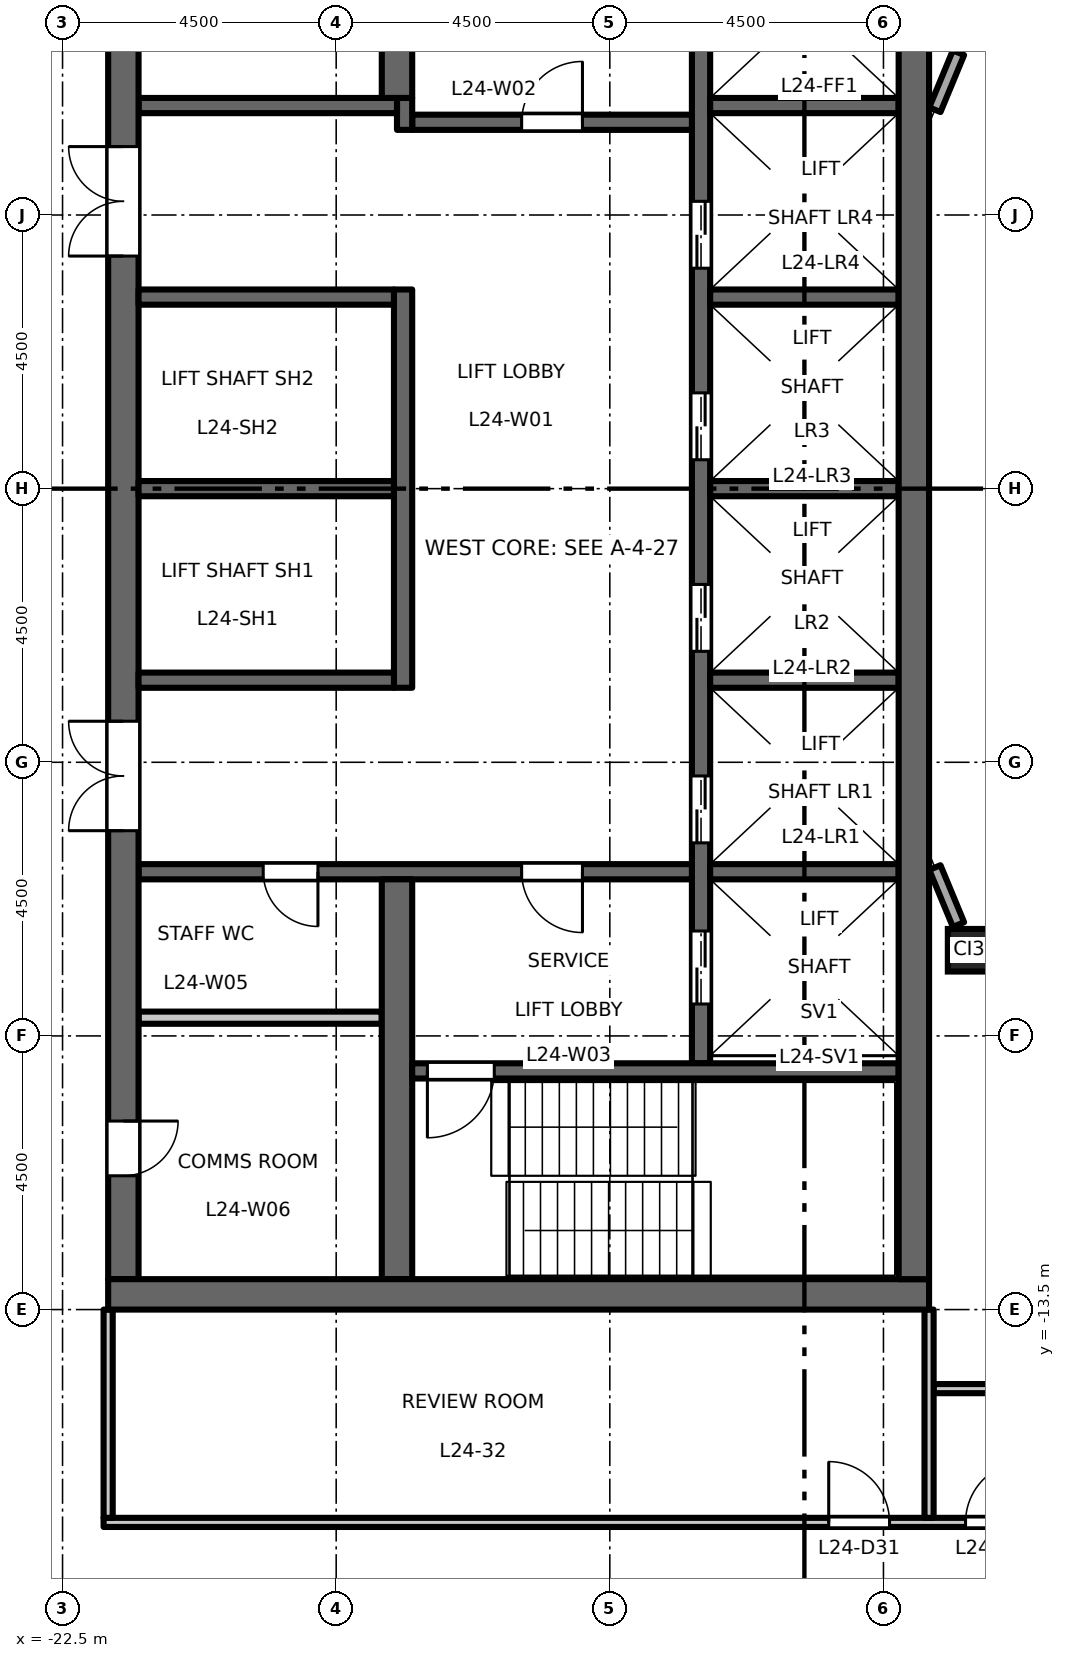
"""IFC4 building model, lengths in metres.
Left out: names, types, materials, properties, quantities, classifications, styles, units other than length and angle.
Written with IfcOpenShell. Run it as: python <this file> out.ifc"""

import sys

from ifc_helpers import new_model, si_unit, direction, frame, frame_2d, origin, origin_2d, place, context, subcontext, project, spatial, rectangle, hollow_rectangle, extrude, element, fill, save


model = new_model("IFC4")
c1 = context("Model", 3, precision=1e-05, world=origin(), true_north=direction((0.0, 1.0)))
c2 = subcontext(c1, "Body", "Model", "MODEL_VIEW")
j1 = project(units=[si_unit("LENGTHUNIT", "METRE"), si_unit("PLANEANGLEUNIT", "RADIAN")], contexts=[c1])
p1 = place(None, origin())
s1 = spatial("IfcSite", under=j1, at=p1, CompositionType="ELEMENT")
p2 = place(p1, origin())
s2 = spatial("IfcBuilding", under=s1, at=p2, CompositionType="ELEMENT")
p3 = place(p2, frame((0.0, 0.0, 113.7)))
s3 = spatial("IfcBuildingStorey", under=s2, at=p3, CompositionType="ELEMENT", Elevation=113.7)
p4 = place(p3, frame((-7.591, -7.591, 0.0), z_axis=(0.0, 0.0, 1.0), x_axis=(1.0, 0.0, 0.0)))
e1 = element("IfcColumn", 1, at=p4, inside=s3, PredefinedType="COLUMN", context=c2, shape_type="SweptSolid", body=[
    extrude(hollow_rectangle(XDim=0.7, YDim=0.7, WallThickness=0.04, at=origin_2d()), origin(), (0.0, 0.0, 1.0), 4.5),
])
p5 = place(p3, frame((-12.0, -9.45, 0.0), z_axis=(0.0, 0.0, 1.0), x_axis=(0.0, 1.0, 0.0)))
e2 = element("IfcWall", 2, at=p5, inside=s3, PredefinedType="SHEAR", context=c2, shape_type="SweptSolid", body=[
    extrude(rectangle(XDim=18.9, YDim=0.3, at=frame_2d((9.45, 0.0))), origin(), (0.0, 0.0, 1.0), 4.35),
])
p6 = place(p5, frame((3.625, 0.0, 0.0)))
e3 = element("IfcOpeningElement", 3, at=p6, cuts=e2, PredefinedType="OPENING", context=c2, shape_type="SweptSolid", body=[
    extrude(rectangle(XDim=1.1, YDim=2.1, at=frame_2d((0.55, 1.05))), frame((0.0, 0.16, 0.0), z_axis=(0.0, -1.0, 0.0), x_axis=(1.0, 0.0, 0.0)), (0.0, 0.0, 1.0), 0.32),
])
p7 = place(p5, frame((6.775, 0.0, 0.0)))
e4 = element("IfcOpeningElement", 4, at=p7, cuts=e2, PredefinedType="OPENING", context=c2, shape_type="SweptSolid", body=[
    extrude(rectangle(XDim=1.1, YDim=2.1, at=frame_2d((0.55, 1.05))), frame((0.0, 0.16, 0.0), z_axis=(0.0, -1.0, 0.0), x_axis=(1.0, 0.0, 0.0)), (0.0, 0.0, 1.0), 0.32),
])
p8 = place(p5, frame((9.925, 0.0, 0.0)))
e5 = element("IfcOpeningElement", 5, at=p8, cuts=e2, PredefinedType="OPENING", context=c2, shape_type="SweptSolid", body=[
    extrude(rectangle(XDim=1.1, YDim=2.1, at=frame_2d((0.55, 1.05))), frame((0.0, 0.16, 0.0), z_axis=(0.0, -1.0, 0.0), x_axis=(1.0, 0.0, 0.0)), (0.0, 0.0, 1.0), 0.32),
])
p9 = place(p5, frame((13.075, 0.0, 0.0)))
e6 = element("IfcOpeningElement", 6, at=p9, cuts=e2, PredefinedType="OPENING", context=c2, shape_type="SweptSolid", body=[
    extrude(rectangle(XDim=1.1, YDim=2.1, at=frame_2d((0.55, 1.05))), frame((0.0, 0.16, 0.0), z_axis=(0.0, -1.0, 0.0), x_axis=(1.0, 0.0, 0.0)), (0.0, 0.0, 1.0), 0.32),
])
p10 = place(p5, frame((16.725, 0.0, 0.0)))
e7 = element("IfcOpeningElement", 7, at=p10, cuts=e2, PredefinedType="OPENING", context=c2, shape_type="SweptSolid", body=[
    extrude(rectangle(XDim=1.2, YDim=2.1, at=frame_2d((0.6, 1.05))), frame((0.0, 0.16, 0.0), z_axis=(0.0, -1.0, 0.0), x_axis=(1.0, 0.0, 0.0)), (0.0, 0.0, 1.0), 0.32),
])
p11 = place(p5, frame((0.975, 0.0, 0.0)))
e8 = element("IfcOpeningElement", 8, at=p11, cuts=e2, PredefinedType="OPENING", context=c2, shape_type="SweptSolid", body=[
    extrude(rectangle(XDim=1.2, YDim=2.1, at=frame_2d((0.6, 1.05))), frame((0.0, 0.16, 0.0), z_axis=(0.0, -1.0, 0.0), x_axis=(1.0, 0.0, 0.0)), (0.0, 0.0, 1.0), 0.32),
])
p12 = place(p3, frame((-12.15, 6.025, 0.0), z_axis=(0.0, 0.0, 1.0), x_axis=(-1.0, 0.0, 0.0)))
e9 = element("IfcWall", 9, at=p12, inside=s3, PredefinedType="SHEAR", context=c2, shape_type="SweptSolid", body=[
    extrude(rectangle(XDim=4.6, YDim=0.25, at=frame_2d((2.3, 0.0))), origin(), (0.0, 0.0, 1.0), 4.35),
])
p13 = place(p12, frame((1.8, 0.0, 0.0)))
e10 = element("IfcOpeningElement", 10, at=p13, cuts=e9, PredefinedType="OPENING", context=c2, shape_type="SweptSolid", body=[
    extrude(rectangle(XDim=1.0, YDim=2.1, at=frame_2d((0.5, 1.05))), frame((0.0, 0.135, 0.0), z_axis=(0.0, -1.0, 0.0), x_axis=(1.0, 0.0, 0.0)), (0.0, 0.0, 1.0), 0.27),
])
p14 = place(p3, frame((-16.875, 5.9, 0.0), z_axis=(0.0, 0.0, 1.0), x_axis=(0.0, 1.0, 0.0)))
e11 = element("IfcWall", 11, at=p14, inside=s3, PredefinedType="SHEAR", context=c2, shape_type="SweptSolid", body=[
    extrude(rectangle(XDim=0.525, YDim=0.25, at=frame_2d((0.263, 0.0))), origin(), (0.0, 0.0, 1.0), 4.35),
])
p15 = place(p3, frame((-17.0, 6.3, 0.0), z_axis=(0.0, 0.0, 1.0), x_axis=(-1.0, 0.0, 0.0)))
e12 = element("IfcWall", 12, at=p15, inside=s3, PredefinedType="SHEAR", context=c2, shape_type="SweptSolid", body=[
    extrude(rectangle(XDim=4.25, YDim=0.25, at=frame_2d((2.125, 0.0))), origin(), (0.0, 0.0, 1.0), 4.35),
])
p16 = place(p3, frame((-12.15, -6.3, 0.0), z_axis=(0.0, 0.0, 1.0), x_axis=(-1.0, 0.0, 0.0)))
e13 = element("IfcWall", 13, at=p16, inside=s3, PredefinedType="SHEAR", context=c2, shape_type="SweptSolid", body=[
    extrude(rectangle(XDim=9.1, YDim=0.25, at=frame_2d((4.55, 0.0))), origin(), (0.0, 0.0, 1.0), 4.35),
])
p17 = place(p16, frame((1.8, 0.0, 0.0)))
e14 = element("IfcOpeningElement", 14, at=p17, cuts=e13, PredefinedType="OPENING", context=c2, shape_type="SweptSolid", body=[
    extrude(rectangle(XDim=1.0, YDim=2.1, at=frame_2d((0.5, 1.05))), frame((0.0, 0.135, 0.0), z_axis=(0.0, -1.0, 0.0), x_axis=(1.0, 0.0, 0.0)), (0.0, 0.0, 1.0), 0.27),
])
p18 = place(p16, frame((6.15, 0.0, 0.0)))
e15 = element("IfcOpeningElement", 15, at=p18, cuts=e13, PredefinedType="OPENING", context=c2, shape_type="SweptSolid", body=[
    extrude(rectangle(XDim=0.9, YDim=2.1, at=frame_2d((0.45, 1.05))), frame((0.0, 0.135, 0.0), z_axis=(0.0, -1.0, 0.0), x_axis=(1.0, 0.0, 0.0)), (0.0, 0.0, 1.0), 0.27),
])
p19 = place(p3, frame((-21.5, -13.0, 0.0), z_axis=(0.0, 0.0, 1.0), x_axis=(0.0, 1.0, 0.0)))
e16 = element("IfcWall", 16, at=p19, inside=s3, PredefinedType="SHEAR", context=c2, shape_type="SweptSolid", body=[
    extrude(rectangle(XDim=26.0, YDim=0.5, at=frame_2d((13.0, 0.0))), origin(), (0.0, 0.0, 1.0), 4.35),
])
p20 = place(p19, frame((16.825, 0.0, 0.0)))
e17 = element("IfcOpeningElement", 17, at=p20, cuts=e16, PredefinedType="OPENING", context=c2, shape_type="SweptSolid", body=[
    extrude(rectangle(XDim=1.8, YDim=2.1, at=frame_2d((0.9, 1.05))), frame((0.0, 0.26, 0.0), z_axis=(0.0, -1.0, 0.0), x_axis=(1.0, 0.0, 0.0)), (0.0, 0.0, 1.0), 0.52),
])
p21 = place(p19, frame((7.375, 0.0, 0.0)))
e18 = element("IfcOpeningElement", 18, at=p21, cuts=e16, PredefinedType="OPENING", context=c2, shape_type="SweptSolid", body=[
    extrude(rectangle(XDim=1.8, YDim=2.1, at=frame_2d((0.9, 1.05))), frame((0.0, 0.26, 0.0), z_axis=(0.0, -1.0, 0.0), x_axis=(1.0, 0.0, 0.0)), (0.0, 0.0, 1.0), 0.52),
])
p22 = place(p19, frame((22.45, 0.0, 0.0)))
e19 = element("IfcOpeningElement", 19, at=p22, cuts=e16, PredefinedType="OPENING", context=c2, shape_type="SweptSolid", body=[
    extrude(rectangle(XDim=0.9, YDim=2.1, at=frame_2d((0.45, 1.05))), frame((0.0, 0.26, 0.0), z_axis=(0.0, -1.0, 0.0), x_axis=(1.0, 0.0, 0.0)), (0.0, 0.0, 1.0), 0.52),
])
p23 = place(p19, frame((1.7, 0.0, 0.0)))
e20 = element("IfcOpeningElement", 20, at=p23, cuts=e16, PredefinedType="OPENING", context=c2, shape_type="SweptSolid", body=[
    extrude(rectangle(XDim=0.9, YDim=2.1, at=frame_2d((0.45, 1.05))), frame((0.0, 0.26, 0.0), z_axis=(0.0, -1.0, 0.0), x_axis=(1.0, 0.0, 0.0)), (0.0, 0.0, 1.0), 0.52),
])
p24 = place(p3, frame((-17.25, -8.7, 0.0), z_axis=(0.0, 0.0, 1.0), x_axis=(-1.0, 0.0, 0.0)))
e21 = element("IfcWall", 21, at=p24, inside=s3, PredefinedType="PARTITIONING", context=c2, shape_type="SweptSolid", body=[
    extrude(rectangle(XDim=4.0, YDim=0.2, at=frame_2d((2.0, 0.0))), origin(), (0.0, 0.0, 1.0), 4.35),
])
p25 = place(p3, frame((-16.9, -3.275, 0.0), z_axis=(0.0, 0.0, 1.0), x_axis=(0.0, 1.0, 0.0)))
e22 = element("IfcWall", 22, at=p25, inside=s3, PredefinedType="SHEAR", context=c2, shape_type="SweptSolid", body=[
    extrude(rectangle(XDim=6.55, YDim=0.3, at=frame_2d((3.275, 0.0))), origin(), (0.0, 0.0, 1.0), 4.35),
])
for number, where, z_axis, x_axis in (
    (23, (-17.05, 0.0, 0.0), (0.0, 0.0, 1.0), (-1.0, 0.0, 0.0)),
    (24, (-17.05, 3.15, 0.0), (0.0, 0.0, 1.0), (-1.0, 0.0, 0.0)),
    (25, (-17.05, -3.15, 0.0), (0.0, 0.0, 1.0), (-1.0, 0.0, 0.0)),
):
    element("IfcWall", number, at=place(p3, frame(where, z_axis=z_axis, x_axis=x_axis)), inside=s3, PredefinedType="SHEAR", context=c2, shape_type="SweptSolid", body=[
        extrude(rectangle(XDim=4.2, YDim=0.25, at=frame_2d((2.1, 0.0))), origin(), (0.0, 0.0, 1.0), 4.35),
    ])
for number, where, z_axis, x_axis in (
    (26, (-17.0, 6.425, 0.0), (0.0, 0.0, 1.0), (0.0, 1.0, 0.0)),
    (27, (-17.0, -13.0, 0.0), (0.0, 0.0, 1.0), (0.0, 1.0, 0.0)),
):
    element("IfcWall", number, at=place(p3, frame(where, z_axis=z_axis, x_axis=x_axis)), inside=s3, PredefinedType="SHEAR", context=c2, shape_type="SweptSolid", body=[
        extrude(rectangle(XDim=6.575, YDim=0.5, at=frame_2d((3.288, 0.0))), origin(), (0.0, 0.0, 1.0), 4.35),
    ])
for number, where, z_axis, x_axis in (
    (28, (-8.75, 0.0, 0.0), (0.0, 0.0, 1.0), (-1.0, 0.0, 0.0)),
    (29, (-8.75, 3.15, 0.0), (0.0, 0.0, 1.0), (-1.0, 0.0, 0.0)),
    (30, (-8.75, 6.3, 0.0), (0.0, 0.0, 1.0), (-1.0, 0.0, 0.0)),
    (31, (-8.75, -3.15, 0.0), (0.0, 0.0, 1.0), (-1.0, 0.0, 0.0)),
    (32, (-8.75, -6.3, 0.0), (0.0, 0.0, 1.0), (-1.0, 0.0, 0.0)),
):
    element("IfcWall", number, at=place(p3, frame(where, z_axis=z_axis, x_axis=x_axis)), inside=s3, PredefinedType="SHEAR", context=c2, shape_type="SweptSolid", body=[
        extrude(rectangle(XDim=3.1, YDim=0.25, at=frame_2d((1.55, 0.0))), origin(), (0.0, 0.0, 1.0), 4.35),
    ])
p26 = place(p3, frame((-8.75, -9.575, 0.0), z_axis=(0.0, 0.0, 1.0), x_axis=(-1.0, 0.0, 0.0)))
e33 = element("IfcWall", 33, at=p26, inside=s3, PredefinedType="SHEAR", context=c2, shape_type="SweptSolid", body=[
    extrude(rectangle(XDim=8.0, YDim=0.25, at=frame_2d((4.0, 0.0))), origin(), (0.0, 0.0, 1.0), 4.35),
])
p27 = place(p26, frame((6.65, 0.0, 0.0)))
e34 = element("IfcOpeningElement", 34, at=p27, cuts=e33, PredefinedType="OPENING", context=c2, shape_type="SweptSolid", body=[
    extrude(rectangle(XDim=1.1, YDim=2.1, at=frame_2d((0.55, 1.05))), frame((0.0, 0.135, 0.0), z_axis=(0.0, -1.0, 0.0), x_axis=(1.0, 0.0, 0.0)), (0.0, 0.0, 1.0), 0.27),
])
p28 = place(p3, frame((-8.25, -13.25, 0.0), z_axis=(0.0, 0.0, 1.0), x_axis=(-1.0, 0.0, 0.0)))
e35 = element("IfcWall", 35, at=p28, inside=s3, PredefinedType="SHEAR", context=c2, shape_type="SweptSolid", body=[
    extrude(rectangle(XDim=13.5, YDim=0.5, at=frame_2d((6.75, 0.0))), origin(), (0.0, 0.0, 1.0), 4.35),
])
p29 = place(p3, frame((-8.5, -13.0, 0.0), z_axis=(0.0, 0.0, 1.0), x_axis=(0.0, 1.0, 0.0)))
e36 = element("IfcWall", 36, at=p29, inside=s3, PredefinedType="SHEAR", context=c2, shape_type="SweptSolid", body=[
    extrude(rectangle(XDim=26.0, YDim=0.5, at=frame_2d((13.0, 0.0))), origin(), (0.0, 0.0, 1.0), 4.35),
])
for number, where, z_axis, x_axis in (
    (37, (-7.766, 7.168, 0.0), (0.0, 0.0, 1.0), (-0.383, -0.924, 0.0)),
    (38, (-8.154, -6.231, 0.0), (0.0, 0.0, 1.0), (0.383, -0.924, 0.0)),
):
    element("IfcWall", number, at=place(p3, frame(where, z_axis=z_axis, x_axis=x_axis)), inside=s3, PredefinedType="STANDARD", context=c2, shape_type="SweptSolid", body=[
        extrude(rectangle(XDim=1.015, YDim=0.2, at=frame_2d((0.507, 0.0))), origin(), (0.0, 0.0, 1.0), 3.826),
    ])
p30 = place(p3, frame((-21.825, -17.0, 0.0), z_axis=(0.0, 0.0, 1.0), x_axis=(1.0, 0.0, 0.0)))
e39 = element("IfcWall", 39, at=p30, inside=s3, PredefinedType="PARTITIONING", context=c2, shape_type="SweptSolid", body=[
    extrude(rectangle(XDim=43.65, YDim=0.15, at=frame_2d((21.825, 0.0))), origin(), (0.0, 0.0, 1.0), 4.35),
])
p31 = place(p30, frame((14.175, 0.0, 0.0)))
e40 = element("IfcOpeningElement", 40, at=p31, cuts=e39, PredefinedType="OPENING", context=c2, shape_type="SweptSolid", body=[
    extrude(rectangle(XDim=1.0, YDim=2.1, at=frame_2d((0.5, 1.05))), frame((0.0, 0.085, 0.0), z_axis=(0.0, -1.0, 0.0), x_axis=(1.0, 0.0, 0.0)), (0.0, 0.0, 1.0), 0.17),
])
p32 = place(p30, frame((11.925, 0.0, 0.0)))
e41 = element("IfcOpeningElement", 41, at=p32, cuts=e39, PredefinedType="OPENING", context=c2, shape_type="SweptSolid", body=[
    extrude(rectangle(XDim=1.0, YDim=2.1, at=frame_2d((0.5, 1.05))), frame((0.0, 0.085, 0.0), z_axis=(0.0, -1.0, 0.0), x_axis=(1.0, 0.0, 0.0)), (0.0, 0.0, 1.0), 0.17),
])
p33 = place(p30, frame((30.675, 0.0, 0.0)))
e42 = element("IfcOpeningElement", 42, at=p33, cuts=e39, PredefinedType="OPENING", context=c2, shape_type="SweptSolid", body=[
    extrude(rectangle(XDim=1.0, YDim=2.1, at=frame_2d((0.5, 1.05))), frame((0.0, 0.085, 0.0), z_axis=(0.0, -1.0, 0.0), x_axis=(1.0, 0.0, 0.0)), (0.0, 0.0, 1.0), 0.17),
])
p34 = place(p3, frame((-8.175, -14.8, 0.0), z_axis=(0.0, 0.0, 1.0), x_axis=(1.0, 0.0, 0.0)))
e43 = element("IfcWall", 43, at=p34, inside=s3, PredefinedType="PARTITIONING", context=c2, shape_type="SweptSolid", body=[
    extrude(rectangle(XDim=15.095, YDim=0.15, at=frame_2d((7.547, 0.0))), origin(), (0.0, 0.0, 1.0), 4.35),
])
p35 = place(p34, frame((4.525, 0.0, 0.0)))
e44 = element("IfcOpeningElement", 44, at=p35, cuts=e43, PredefinedType="OPENING", context=c2, shape_type="SweptSolid", body=[
    extrude(rectangle(XDim=1.0, YDim=2.1, at=frame_2d((0.5, 1.05))), frame((0.0, 0.085, 0.0), z_axis=(0.0, -1.0, 0.0), x_axis=(1.0, 0.0, 0.0)), (0.0, 0.0, 1.0), 0.17),
])
p36 = place(p34, frame((6.775, 0.0, 0.0)))
e45 = element("IfcOpeningElement", 45, at=p36, cuts=e43, PredefinedType="OPENING", context=c2, shape_type="SweptSolid", body=[
    extrude(rectangle(XDim=1.0, YDim=2.1, at=frame_2d((0.5, 1.05))), frame((0.0, 0.085, 0.0), z_axis=(0.0, -1.0, 0.0), x_axis=(1.0, 0.0, 0.0)), (0.0, 0.0, 1.0), 0.17),
])
p37 = place(p34, frame((13.445, 0.0, 0.0)))
e46 = element("IfcOpeningElement", 46, at=p37, cuts=e43, PredefinedType="OPENING", context=c2, shape_type="SweptSolid", body=[
    extrude(rectangle(XDim=1.0, YDim=2.1, at=frame_2d((0.5, 1.05))), frame((0.0, 0.085, 0.0), z_axis=(0.0, -1.0, 0.0), x_axis=(1.0, 0.0, 0.0)), (0.0, 0.0, 1.0), 0.17),
])
for number, where, z_axis, x_axis in (
    (47, (-21.75, -16.925, 0.0), (0.0, 0.0, 1.0), (0.0, 1.0, 0.0)),
    (48, (-8.25, -16.925, 0.0), (0.0, 0.0, 1.0), (0.0, 1.0, 0.0)),
):
    element("IfcWall", number, at=place(p3, frame(where, z_axis=z_axis, x_axis=x_axis)), inside=s3, PredefinedType="PARTITIONING", context=c2, shape_type="SweptSolid", body=[
        extrude(rectangle(XDim=3.425, YDim=0.15, at=frame_2d((1.712, 0.0))), origin(), (0.0, 0.0, 1.0), 4.35),
    ])
p38 = place(p13, origin())
e49 = element("IfcDoor", 49, at=p38, inside=s3, OperationType="SINGLE_SWING_LEFT", PredefinedType="DOOR", context=c2, shape_type="SweptSolid", body=[
    extrude(rectangle(XDim=1.0, YDim=2.1, at=frame_2d((0.5, 1.05))), frame((0.0, 0.025, 0.0), z_axis=(0.0, -1.0, 0.0), x_axis=(1.0, 0.0, 0.0)), (0.0, 0.0, 1.0), 0.05),
])
fill(e10, e49)
p39 = place(p17, origin())
e50 = element("IfcDoor", 50, at=p39, inside=s3, OperationType="SINGLE_SWING_RIGHT", PredefinedType="DOOR", context=c2, shape_type="SweptSolid", body=[
    extrude(rectangle(XDim=1.0, YDim=2.1, at=frame_2d((0.5, 1.05))), frame((0.0, 0.025, 0.0), z_axis=(0.0, -1.0, 0.0), x_axis=(1.0, 0.0, 0.0)), (0.0, 0.0, 1.0), 0.05),
])
fill(e14, e50)
p40 = place(p27, origin())
e51 = element("IfcDoor", 51, at=p40, inside=s3, OperationType="SINGLE_SWING_LEFT", PredefinedType="DOOR", context=c2, shape_type="SweptSolid", body=[
    extrude(rectangle(XDim=1.1, YDim=2.1, at=frame_2d((0.55, 1.05))), frame((0.0, 0.025, 0.0), z_axis=(0.0, -1.0, 0.0), x_axis=(1.0, 0.0, 0.0)), (0.0, 0.0, 1.0), 0.05),
])
fill(e34, e51)
p41 = place(p20, origin())
e52 = element("IfcDoor", 52, at=p41, inside=s3, OperationType="DOUBLE_DOOR_DOUBLE_SWING", PredefinedType="DOOR", context=c2, shape_type="SweptSolid", body=[
    extrude(rectangle(XDim=1.8, YDim=2.1, at=frame_2d((0.9, 1.05))), frame((0.0, 0.025, 0.0), z_axis=(0.0, -1.0, 0.0), x_axis=(1.0, 0.0, 0.0)), (0.0, 0.0, 1.0), 0.05),
])
fill(e17, e52)
p42 = place(p21, origin())
e53 = element("IfcDoor", 53, at=p42, inside=s3, OperationType="DOUBLE_DOOR_DOUBLE_SWING", PredefinedType="DOOR", context=c2, shape_type="SweptSolid", body=[
    extrude(rectangle(XDim=1.8, YDim=2.1, at=frame_2d((0.9, 1.05))), frame((0.0, 0.025, 0.0), z_axis=(0.0, -1.0, 0.0), x_axis=(1.0, 0.0, 0.0)), (0.0, 0.0, 1.0), 0.05),
])
fill(e18, e53)
p43 = place(p6, origin())
e54 = element("IfcDoor", 54, at=p43, inside=s3, OperationType="DOUBLE_DOOR_SLIDING", PredefinedType="DOOR", context=c2, shape_type="SweptSolid", body=[
    extrude(rectangle(XDim=1.1, YDim=2.1, at=frame_2d((0.55, 1.05))), frame((0.0, 0.025, 0.0), z_axis=(0.0, -1.0, 0.0), x_axis=(1.0, 0.0, 0.0)), (0.0, 0.0, 1.0), 0.05),
])
fill(e3, e54)
p44 = place(p7, origin())
e55 = element("IfcDoor", 55, at=p44, inside=s3, OperationType="DOUBLE_DOOR_SLIDING", PredefinedType="DOOR", context=c2, shape_type="SweptSolid", body=[
    extrude(rectangle(XDim=1.1, YDim=2.1, at=frame_2d((0.55, 1.05))), frame((0.0, 0.025, 0.0), z_axis=(0.0, -1.0, 0.0), x_axis=(1.0, 0.0, 0.0)), (0.0, 0.0, 1.0), 0.05),
])
fill(e4, e55)
p45 = place(p8, origin())
e56 = element("IfcDoor", 56, at=p45, inside=s3, OperationType="DOUBLE_DOOR_SLIDING", PredefinedType="DOOR", context=c2, shape_type="SweptSolid", body=[
    extrude(rectangle(XDim=1.1, YDim=2.1, at=frame_2d((0.55, 1.05))), frame((0.0, 0.025, 0.0), z_axis=(0.0, -1.0, 0.0), x_axis=(1.0, 0.0, 0.0)), (0.0, 0.0, 1.0), 0.05),
])
fill(e5, e56)
p46 = place(p9, origin())
e57 = element("IfcDoor", 57, at=p46, inside=s3, OperationType="DOUBLE_DOOR_SLIDING", PredefinedType="DOOR", context=c2, shape_type="SweptSolid", body=[
    extrude(rectangle(XDim=1.1, YDim=2.1, at=frame_2d((0.55, 1.05))), frame((0.0, 0.025, 0.0), z_axis=(0.0, -1.0, 0.0), x_axis=(1.0, 0.0, 0.0)), (0.0, 0.0, 1.0), 0.05),
])
fill(e6, e57)
p47 = place(p11, origin())
e58 = element("IfcDoor", 58, at=p47, inside=s3, OperationType="DOUBLE_DOOR_SLIDING", PredefinedType="DOOR", context=c2, shape_type="SweptSolid", body=[
    extrude(rectangle(XDim=1.2, YDim=2.1, at=frame_2d((0.6, 1.05))), frame((0.0, 0.025, 0.0), z_axis=(0.0, -1.0, 0.0), x_axis=(1.0, 0.0, 0.0)), (0.0, 0.0, 1.0), 0.05),
])
fill(e8, e58)
p48 = place(p18, origin())
e59 = element("IfcDoor", 59, at=p48, inside=s3, OperationType="SINGLE_SWING_RIGHT", PredefinedType="DOOR", context=c2, shape_type="SweptSolid", body=[
    extrude(rectangle(XDim=0.9, YDim=2.1, at=frame_2d((0.45, 1.05))), frame((0.0, 0.025, 0.0), z_axis=(0.0, -1.0, 0.0), x_axis=(1.0, 0.0, 0.0)), (0.0, 0.0, 1.0), 0.05),
])
fill(e15, e59)
p49 = place(p23, origin())
e60 = element("IfcDoor", 60, at=p49, inside=s3, OperationType="SINGLE_SWING_RIGHT", PredefinedType="DOOR", context=c2, shape_type="SweptSolid", body=[
    extrude(rectangle(XDim=0.9, YDim=2.1, at=frame_2d((0.45, 1.05))), frame((0.0, 0.025, 0.0), z_axis=(0.0, -1.0, 0.0), x_axis=(1.0, 0.0, 0.0)), (0.0, 0.0, 1.0), 0.05),
])
fill(e20, e60)
p50 = place(p31, origin())
e61 = element("IfcDoor", 61, at=p50, inside=s3, OperationType="SINGLE_SWING_RIGHT", PredefinedType="DOOR", context=c2, shape_type="SweptSolid", body=[
    extrude(rectangle(XDim=1.0, YDim=2.1, at=frame_2d((0.5, 1.05))), frame((0.0, 0.025, 0.0), z_axis=(0.0, -1.0, 0.0), x_axis=(1.0, 0.0, 0.0)), (0.0, 0.0, 1.0), 0.05),
])
fill(e40, e61)
p51 = place(p32, origin())
e62 = element("IfcDoor", 62, at=p51, inside=s3, OperationType="SINGLE_SWING_LEFT", PredefinedType="DOOR", context=c2, shape_type="SweptSolid", body=[
    extrude(rectangle(XDim=1.0, YDim=2.1, at=frame_2d((0.5, 1.05))), frame((0.0, 0.025, 0.0), z_axis=(0.0, -1.0, 0.0), x_axis=(1.0, 0.0, 0.0)), (0.0, 0.0, 1.0), 0.05),
])
fill(e41, e62)
save(model, sys.argv[1])
